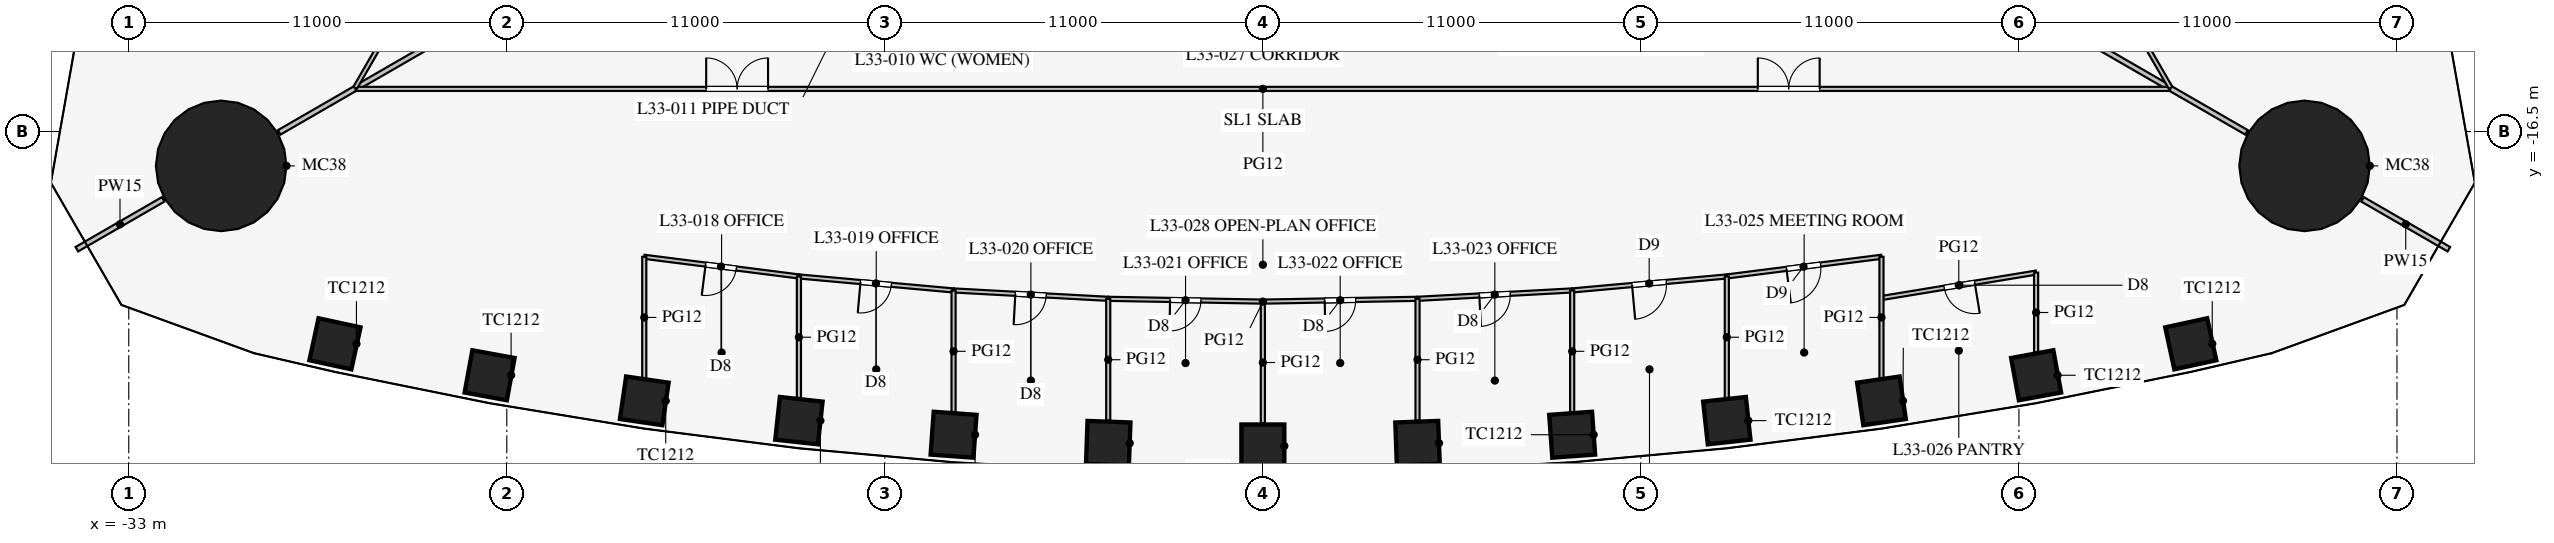
"""IFC4 building model, lengths in metres.
Left out: names, types, materials, properties, quantities, classifications, styles, units other than length and angle.
Written with IfcOpenShell. Run it as: python <this file> out.ifc"""

import sys

from ifc_helpers import new_model, si_unit, direction, frame, frame_2d, origin, origin_2d, place, context, subcontext, project, spatial, rectangle, circle, extrude, element, fill, save


model = new_model("IFC4")
c1 = context("Model", 3, precision=1e-05, world=origin(), true_north=direction((0.0, 1.0)))
c2 = subcontext(c1, "Body", "Model", "MODEL_VIEW")
j1 = project(units=[si_unit("LENGTHUNIT", "METRE"), si_unit("PLANEANGLEUNIT", "RADIAN")], contexts=[c1])
p1 = place(None, origin())
s1 = spatial("IfcSite", under=j1, at=p1, CompositionType="ELEMENT")
p2 = place(p1, origin())
s2 = spatial("IfcBuilding", under=s1, at=p2, CompositionType="ELEMENT")
p3 = place(p2, frame((0.0, 0.0, 145.1)))
s3 = spatial("IfcBuildingStorey", under=s2, at=p3, CompositionType="ELEMENT", Elevation=145.1)
for number, where, z_axis, x_axis in (
    (1, (-27.0, -22.677, 0.0), (0.0, 0.0, 1.0), (0.977, -0.212, 0.0)),
    (2, (-22.5, -23.593, 0.0), (0.0, 0.0, 1.0), (0.984, -0.18, 0.0)),
    (3, (-18.0, -24.337, 0.0), (0.0, 0.0, 1.0), (0.99, -0.144, 0.0)),
    (4, (-13.5, -24.913, 0.0), (0.0, 0.0, 1.0), (0.994, -0.108, 0.0)),
    (5, (-9.0, -25.323, 0.0), (0.0, 0.0, 1.0), (0.997, -0.072, 0.0)),
    (6, (-4.5, -25.568, 0.0), (0.0, 0.0, 1.0), (0.999, -0.036, 0.0)),
    (7, (0.0, -25.65, 0.0), (0.0, 0.0, 1.0), (1.0, 0.0, 0.0)),
    (8, (4.5, -25.568, 0.0), (0.0, 0.0, 1.0), (0.999, 0.036, 0.0)),
    (9, (9.0, -25.323, 0.0), (0.0, 0.0, 1.0), (0.997, 0.072, 0.0)),
    (10, (13.5, -24.913, 0.0), (0.0, 0.0, 1.0), (0.994, 0.108, 0.0)),
    (11, (18.0, -24.337, 0.0), (0.0, 0.0, 1.0), (0.99, 0.144, 0.0)),
    (12, (22.5, -23.593, 0.0), (0.0, 0.0, 1.0), (0.984, 0.18, 0.0)),
    (13, (27.0, -22.677, 0.0), (0.0, 0.0, 1.0), (0.977, 0.212, 0.0)),
):
    element("IfcColumn", number, at=place(p3, frame(where, z_axis=z_axis, x_axis=x_axis)), inside=s3, PredefinedType="COLUMN", context=c2, shape_type="SweptSolid", body=[
        extrude(rectangle(XDim=1.25, YDim=1.25, at=origin_2d()), origin(), (0.0, 0.0, 1.0), 4.2),
    ])
for number, where, z_axis, x_axis in (
    (14, (30.311, -17.5, 0.0), (0.0, 0.0, 1.0), (1.0, 0.0, 0.0)),
    (15, (-30.311, -17.5, 0.0), (0.0, 0.0, 1.0), (1.0, 0.0, 0.0)),
):
    element("IfcColumn", number, at=place(p3, frame(where, z_axis=z_axis, x_axis=x_axis)), inside=s3, PredefinedType="COLUMN", context=c2, shape_type="SweptSolid", body=[
        extrude(circle(Radius=1.9, at=origin_2d()), origin(), (0.0, 0.0, 1.0), 4.2),
    ])
p4 = place(p3, frame((14.203, -8.2, 0.0), z_axis=(0.0, 0.0, 1.0), x_axis=(0.866024668836, -0.500001272966, 0.0)))
e16 = element("IfcWall", 16, at=p4, inside=s3, PredefinedType="PARTITIONING", context=c2, shape_type="SweptSolid", body=[
    extrude(rectangle(XDim=16.65, YDim=0.15, at=frame_2d((8.325, 0.0))), origin(), (0.0, 0.0, 1.0), 2.3),
])
p5 = place(p3, frame((32.0, -18.475, 0.0), z_axis=(0.0, 0.0, 1.0), x_axis=(0.866042548026, -0.499970304126, 0.0)))
e17 = element("IfcWall", 17, at=p5, inside=s3, PredefinedType="PARTITIONING", context=c2, shape_type="SweptSolid", body=[
    extrude(rectangle(XDim=2.899, YDim=0.15, at=frame_2d((1.45, 0.0))), origin(), (0.0, 0.0, 1.0), 2.3),
])
p6 = place(p3, frame((-14.203, -8.2, 0.0), z_axis=(0.0, 0.0, 1.0), x_axis=(-0.866024668836, -0.500001272966, 0.0)))
e18 = element("IfcWall", 18, at=p6, inside=s3, PredefinedType="PARTITIONING", context=c2, shape_type="SweptSolid", body=[
    extrude(rectangle(XDim=16.65, YDim=0.15, at=frame_2d((8.325, 0.0))), origin(), (0.0, 0.0, 1.0), 2.3),
])
p7 = place(p3, frame((-32.0, -18.475, 0.0), z_axis=(0.0, 0.0, 1.0), x_axis=(-0.866042548026, -0.499970304126, 0.0)))
e19 = element("IfcWall", 19, at=p7, inside=s3, PredefinedType="PARTITIONING", context=c2, shape_type="SweptSolid", body=[
    extrude(rectangle(XDim=2.899, YDim=0.15, at=frame_2d((1.45, 0.0))), origin(), (0.0, 0.0, 1.0), 2.3),
])
p8 = place(p3, frame((-26.398, -15.26, 0.0), z_axis=(0.0, 0.0, 1.0), x_axis=(1.0, 0.0, 0.0)))
e20 = element("IfcWall", 20, at=p8, inside=s3, PredefinedType="PARTITIONING", context=c2, shape_type="SweptSolid", body=[
    extrude(rectangle(XDim=52.796, YDim=0.12, at=frame_2d((26.398, 0.0))), origin(), (0.0, 0.0, 1.0), 2.9),
])
p9 = place(p8, frame((10.2, 0.0, 0.15)))
e21 = element("IfcOpeningElement", 21, at=p9, cuts=e20, PredefinedType="OPENING", context=c2, shape_type="SweptSolid", body=[
    extrude(rectangle(XDim=1.8, YDim=2.1, at=frame_2d((0.9, 1.05))), frame((0.0, 0.07, 0.0), z_axis=(0.0, -1.0, 0.0), x_axis=(1.0, 0.0, 0.0)), (0.0, 0.0, 1.0), 0.14),
])
p10 = place(p8, frame((40.8, 0.0, 0.15)))
e22 = element("IfcOpeningElement", 22, at=p10, cuts=e20, PredefinedType="OPENING", context=c2, shape_type="SweptSolid", body=[
    extrude(rectangle(XDim=1.8, YDim=2.1, at=frame_2d((0.9, 1.05))), frame((0.0, 0.07, 0.0), z_axis=(0.0, -1.0, 0.0), x_axis=(1.0, 0.0, 0.0)), (0.0, 0.0, 1.0), 0.14),
])
p11 = place(p3, frame((0.0, -21.45, 0.0), z_axis=(0.0, 0.0, 1.0), x_axis=(0.999837820638, 0.018009231578, 0.0)))
e23 = element("IfcWall", 23, at=p11, inside=s3, PredefinedType="PARTITIONING", context=c2, shape_type="SweptSolid", body=[
    extrude(rectangle(XDim=4.501, YDim=0.12, at=frame_2d((2.25, 0.0))), origin(), (0.0, 0.0, 1.0), 2.9),
])
p12 = place(p11, frame((1.8, 0.0, 0.15)))
e24 = element("IfcOpeningElement", 24, at=p12, cuts=e23, PredefinedType="OPENING", context=c2, shape_type="SweptSolid", body=[
    extrude(rectangle(XDim=0.9, YDim=2.1, at=frame_2d((0.45, 1.05))), frame((0.0, 0.07, 0.0), z_axis=(0.0, -1.0, 0.0), x_axis=(1.0, 0.0, 0.0)), (0.0, 0.0, 1.0), 0.14),
])
p13 = place(p3, frame((13.5, -20.718, 0.0), z_axis=(0.0, 0.0, 1.0), x_axis=(0.992010652594, 0.12615413247, 0.0)))
e25 = element("IfcWall", 25, at=p13, inside=s3, PredefinedType="PARTITIONING", context=c2, shape_type="SweptSolid", body=[
    extrude(rectangle(XDim=4.536, YDim=0.12, at=frame_2d((2.268, 0.0))), origin(), (0.0, 0.0, 1.0), 2.9),
])
p14 = place(p13, frame((1.75, 0.0, 0.15)))
e26 = element("IfcOpeningElement", 26, at=p14, cuts=e25, PredefinedType="OPENING", context=c2, shape_type="SweptSolid", body=[
    extrude(rectangle(XDim=1.0, YDim=2.1, at=frame_2d((0.5, 1.05))), frame((0.0, 0.07, 0.0), z_axis=(0.0, -1.0, 0.0), x_axis=(1.0, 0.0, 0.0)), (0.0, 0.0, 1.0), 0.14),
])
p15 = place(p3, frame((18.0, -21.345, 0.0), z_axis=(0.0, 0.0, 1.0), x_axis=(0.986764681833, 0.162158757664, 0.0)))
e27 = element("IfcWall", 27, at=p15, inside=s3, PredefinedType="PARTITIONING", context=c2, shape_type="SweptSolid", body=[
    extrude(rectangle(XDim=4.56, YDim=0.12, at=frame_2d((2.28, 0.0))), origin(), (0.0, 0.0, 1.0), 2.9),
])
p16 = place(p15, frame((1.85, 0.0, 0.15)))
e28 = element("IfcOpeningElement", 28, at=p16, cuts=e27, PredefinedType="OPENING", context=c2, shape_type="SweptSolid", body=[
    extrude(rectangle(XDim=0.9, YDim=2.1, at=frame_2d((0.45, 1.05))), frame((0.0, 0.07, 0.0), z_axis=(0.0, -1.0, 0.0), x_axis=(1.0, 0.0, 0.0)), (0.0, 0.0, 1.0), 0.14),
])
p17 = place(p3, frame((4.5, -21.369, 0.0), z_axis=(0.0, 0.0, 1.0), x_axis=(0.998537376538, 0.054065771581, 0.0)))
e29 = element("IfcWall", 29, at=p17, inside=s3, PredefinedType="PARTITIONING", context=c2, shape_type="SweptSolid", body=[
    extrude(rectangle(XDim=4.507, YDim=0.12, at=frame_2d((2.253, 0.0))), origin(), (0.0, 0.0, 1.0), 2.9),
])
p18 = place(p17, frame((1.8, 0.0, 0.15)))
e30 = element("IfcOpeningElement", 30, at=p18, cuts=e29, PredefinedType="OPENING", context=c2, shape_type="SweptSolid", body=[
    extrude(rectangle(XDim=0.9, YDim=2.1, at=frame_2d((0.45, 1.05))), frame((0.0, 0.07, 0.0), z_axis=(0.0, -1.0, 0.0), x_axis=(1.0, 0.0, 0.0)), (0.0, 0.0, 1.0), 0.14),
])
p19 = place(p3, frame((9.0, -21.125, 0.0), z_axis=(0.0, 0.0, 1.0), x_axis=(0.995930325215, 0.090126507295, 0.0)))
e31 = element("IfcWall", 31, at=p19, inside=s3, PredefinedType="PARTITIONING", context=c2, shape_type="SweptSolid", body=[
    extrude(rectangle(XDim=4.518, YDim=0.12, at=frame_2d((2.259, 0.0))), origin(), (0.0, 0.0, 1.0), 2.9),
])
p20 = place(p19, frame((1.75, 0.0, 0.15)))
e32 = element("IfcOpeningElement", 32, at=p20, cuts=e31, PredefinedType="OPENING", context=c2, shape_type="SweptSolid", body=[
    extrude(rectangle(XDim=1.0, YDim=2.1, at=frame_2d((0.5, 1.05))), frame((0.0, 0.07, 0.0), z_axis=(0.0, -1.0, 0.0), x_axis=(1.0, 0.0, 0.0)), (0.0, 0.0, 1.0), 0.14),
])
p21 = place(p3, frame((-13.5, -20.718, 0.0), z_axis=(0.0, 0.0, 1.0), x_axis=(0.995930325215, -0.090126507295, 0.0)))
e33 = element("IfcWall", 33, at=p21, inside=s3, PredefinedType="PARTITIONING", context=c2, shape_type="SweptSolid", body=[
    extrude(rectangle(XDim=4.518, YDim=0.12, at=frame_2d((2.259, 0.0))), origin(), (0.0, 0.0, 1.0), 2.9),
])
p22 = place(p21, frame((1.8, 0.0, 0.15)))
e34 = element("IfcOpeningElement", 34, at=p22, cuts=e33, PredefinedType="OPENING", context=c2, shape_type="SweptSolid", body=[
    extrude(rectangle(XDim=0.9, YDim=2.1, at=frame_2d((0.45, 1.05))), frame((0.0, 0.07, 0.0), z_axis=(0.0, -1.0, 0.0), x_axis=(1.0, 0.0, 0.0)), (0.0, 0.0, 1.0), 0.14),
])
p23 = place(p3, frame((-18.0, -20.146, 0.0), z_axis=(0.0, 0.0, 1.0), x_axis=(0.992010652594, -0.12615413247, 0.0)))
e35 = element("IfcWall", 35, at=p23, inside=s3, PredefinedType="PARTITIONING", context=c2, shape_type="SweptSolid", body=[
    extrude(rectangle(XDim=4.536, YDim=0.12, at=frame_2d((2.268, 0.0))), origin(), (0.0, 0.0, 1.0), 2.9),
])
p24 = place(p23, frame((1.8, 0.0, 0.15)))
e36 = element("IfcOpeningElement", 36, at=p24, cuts=e35, PredefinedType="OPENING", context=c2, shape_type="SweptSolid", body=[
    extrude(rectangle(XDim=0.9, YDim=2.1, at=frame_2d((0.45, 1.05))), frame((0.0, 0.07, 0.0), z_axis=(0.0, -1.0, 0.0), x_axis=(1.0, 0.0, 0.0)), (0.0, 0.0, 1.0), 0.14),
])
p25 = place(p3, frame((-4.5, -21.369, 0.0), z_axis=(0.0, 0.0, 1.0), x_axis=(0.999837820638, -0.018009231578, 0.0)))
e37 = element("IfcWall", 37, at=p25, inside=s3, PredefinedType="PARTITIONING", context=c2, shape_type="SweptSolid", body=[
    extrude(rectangle(XDim=4.501, YDim=0.12, at=frame_2d((2.25, 0.0))), origin(), (0.0, 0.0, 1.0), 2.9),
])
p26 = place(p25, frame((1.8, 0.0, 0.15)))
e38 = element("IfcOpeningElement", 38, at=p26, cuts=e37, PredefinedType="OPENING", context=c2, shape_type="SweptSolid", body=[
    extrude(rectangle(XDim=0.9, YDim=2.1, at=frame_2d((0.45, 1.05))), frame((0.0, 0.07, 0.0), z_axis=(0.0, -1.0, 0.0), x_axis=(1.0, 0.0, 0.0)), (0.0, 0.0, 1.0), 0.14),
])
p27 = place(p3, frame((-9.0, -21.125, 0.0), z_axis=(0.0, 0.0, 1.0), x_axis=(0.998537376538, -0.054065771581, 0.0)))
e39 = element("IfcWall", 39, at=p27, inside=s3, PredefinedType="PARTITIONING", context=c2, shape_type="SweptSolid", body=[
    extrude(rectangle(XDim=4.507, YDim=0.12, at=frame_2d((2.253, 0.0))), origin(), (0.0, 0.0, 1.0), 2.9),
])
p28 = place(p27, frame((1.8, 0.0, 0.15)))
e40 = element("IfcOpeningElement", 40, at=p28, cuts=e39, PredefinedType="OPENING", context=c2, shape_type="SweptSolid", body=[
    extrude(rectangle(XDim=0.9, YDim=2.1, at=frame_2d((0.45, 1.05))), frame((0.0, 0.07, 0.0), z_axis=(0.0, -1.0, 0.0), x_axis=(1.0, 0.0, 0.0)), (0.0, 0.0, 1.0), 0.14),
])
p29 = place(p3, frame((0.0, -21.45, 0.0), z_axis=(0.0, 0.0, 1.0), x_axis=(0.0, -1.0, 0.0)))
e41 = element("IfcWall", 41, at=p29, inside=s3, PredefinedType="PARTITIONING", context=c2, shape_type="SweptSolid", body=[
    extrude(rectangle(XDim=3.545, YDim=0.12, at=frame_2d((1.772, 0.0))), origin(), (0.0, 0.0, 1.0), 2.9),
])
p30 = place(p3, frame((13.5, -20.718, 0.0), z_axis=(0.0, 0.0, 1.0), x_axis=(0.0, -1.0, 0.0)))
e42 = element("IfcWall", 42, at=p30, inside=s3, PredefinedType="PARTITIONING", context=c2, shape_type="SweptSolid", body=[
    extrude(rectangle(XDim=3.537, YDim=0.12, at=frame_2d((1.768, 0.0))), origin(), (0.0, 0.0, 1.0), 2.9),
])
p31 = place(p3, frame((18.0, -20.146, 0.0), z_axis=(0.0, 0.0, 1.0), x_axis=(0.0, -1.0, 0.0)))
e43 = element("IfcWall", 43, at=p31, inside=s3, PredefinedType="PARTITIONING", context=c2, shape_type="SweptSolid", body=[
    extrude(rectangle(XDim=3.53, YDim=0.12, at=frame_2d((1.765, 0.0))), origin(), (0.0, 0.0, 1.0), 2.9),
])
p32 = place(p3, frame((22.5, -20.606, 0.0), z_axis=(0.0, 0.0, 1.0), x_axis=(0.0, -1.0, 0.0)))
e44 = element("IfcWall", 44, at=p32, inside=s3, PredefinedType="PARTITIONING", context=c2, shape_type="SweptSolid", body=[
    extrude(rectangle(XDim=2.321, YDim=0.12, at=frame_2d((1.16, 0.0))), origin(), (0.0, 0.0, 1.0), 2.9),
])
p33 = place(p3, frame((4.5, -21.369, 0.0), z_axis=(0.0, 0.0, 1.0), x_axis=(0.0, -1.0, 0.0)))
e45 = element("IfcWall", 45, at=p33, inside=s3, PredefinedType="PARTITIONING", context=c2, shape_type="SweptSolid", body=[
    extrude(rectangle(XDim=3.544, YDim=0.12, at=frame_2d((1.772, 0.0))), origin(), (0.0, 0.0, 1.0), 2.9),
])
p34 = place(p3, frame((9.0, -21.125, 0.0), z_axis=(0.0, 0.0, 1.0), x_axis=(0.0, -1.0, 0.0)))
e46 = element("IfcWall", 46, at=p34, inside=s3, PredefinedType="PARTITIONING", context=c2, shape_type="SweptSolid", body=[
    extrude(rectangle(XDim=3.541, YDim=0.12, at=frame_2d((1.771, 0.0))), origin(), (0.0, 0.0, 1.0), 2.9),
])
p35 = place(p3, frame((-13.5, -20.718, 0.0), z_axis=(0.0, 0.0, 1.0), x_axis=(0.0, -1.0, 0.0)))
e47 = element("IfcWall", 47, at=p35, inside=s3, PredefinedType="PARTITIONING", context=c2, shape_type="SweptSolid", body=[
    extrude(rectangle(XDim=3.537, YDim=0.12, at=frame_2d((1.768, 0.0))), origin(), (0.0, 0.0, 1.0), 2.9),
])
p36 = place(p3, frame((-18.0, -20.146, 0.0), z_axis=(0.0, 0.0, 1.0), x_axis=(0.0, -1.0, 0.0)))
e48 = element("IfcWall", 48, at=p36, inside=s3, PredefinedType="PARTITIONING", context=c2, shape_type="SweptSolid", body=[
    extrude(rectangle(XDim=3.53, YDim=0.12, at=frame_2d((1.765, 0.0))), origin(), (0.0, 0.0, 1.0), 2.9),
])
p37 = place(p3, frame((-4.5, -21.369, 0.0), z_axis=(0.0, 0.0, 1.0), x_axis=(0.0, -1.0, 0.0)))
e49 = element("IfcWall", 49, at=p37, inside=s3, PredefinedType="PARTITIONING", context=c2, shape_type="SweptSolid", body=[
    extrude(rectangle(XDim=3.544, YDim=0.12, at=frame_2d((1.772, 0.0))), origin(), (0.0, 0.0, 1.0), 2.9),
])
p38 = place(p3, frame((-9.0, -21.125, 0.0), z_axis=(0.0, 0.0, 1.0), x_axis=(0.0, -1.0, 0.0)))
e50 = element("IfcWall", 50, at=p38, inside=s3, PredefinedType="PARTITIONING", context=c2, shape_type="SweptSolid", body=[
    extrude(rectangle(XDim=3.541, YDim=0.12, at=frame_2d((1.771, 0.0))), origin(), (0.0, 0.0, 1.0), 2.9),
])
p39 = place(p3, frame((26.415, -15.231, 0.0), z_axis=(0.0, 0.0, 1.0), x_axis=(-0.50000091641, 0.866024874695, 0.0)))
e51 = element("IfcWall", 51, at=p39, inside=s3, PredefinedType="PARTITIONING", context=c2, shape_type="SweptSolid", body=[
    extrude(rectangle(XDim=52.796, YDim=0.12, at=frame_2d((26.398, 0.0))), origin(), (0.0, 0.0, 1.0), 2.9),
])
p40 = place(p39, frame((10.2, 0.0, 0.15)))
e52 = element("IfcOpeningElement", 52, at=p40, cuts=e51, PredefinedType="OPENING", context=c2, shape_type="SweptSolid", body=[
    extrude(rectangle(XDim=1.8, YDim=2.1, at=frame_2d((0.9, 1.05))), frame((0.0, 0.07, 0.0), z_axis=(0.0, -1.0, 0.0), x_axis=(1.0, 0.0, 0.0)), (0.0, 0.0, 1.0), 0.14),
])
p41 = place(p39, frame((40.8, 0.0, 0.15)))
e53 = element("IfcOpeningElement", 53, at=p41, cuts=e51, PredefinedType="OPENING", context=c2, shape_type="SweptSolid", body=[
    extrude(rectangle(XDim=1.8, YDim=2.1, at=frame_2d((0.9, 1.05))), frame((0.0, 0.07, 0.0), z_axis=(0.0, -1.0, 0.0), x_axis=(1.0, 0.0, 0.0)), (0.0, 0.0, 1.0), 0.14),
])
p42 = place(p3, frame((-0.016, 30.491, 0.0), z_axis=(0.0, 0.0, 1.0), x_axis=(-0.50000091641, -0.866024874695, 0.0)))
e54 = element("IfcWall", 54, at=p42, inside=s3, PredefinedType="PARTITIONING", context=c2, shape_type="SweptSolid", body=[
    extrude(rectangle(XDim=52.796, YDim=0.12, at=frame_2d((26.398, 0.0))), origin(), (0.0, 0.0, 1.0), 2.9),
])
p43 = place(p42, frame((10.2, 0.0, 0.15)))
e55 = element("IfcOpeningElement", 55, at=p43, cuts=e54, PredefinedType="OPENING", context=c2, shape_type="SweptSolid", body=[
    extrude(rectangle(XDim=1.8, YDim=2.1, at=frame_2d((0.9, 1.05))), frame((0.0, 0.07, 0.0), z_axis=(0.0, -1.0, 0.0), x_axis=(1.0, 0.0, 0.0)), (0.0, 0.0, 1.0), 0.14),
])
p44 = place(p42, frame((40.8, 0.0, 0.15)))
e56 = element("IfcOpeningElement", 56, at=p44, cuts=e54, PredefinedType="OPENING", context=c2, shape_type="SweptSolid", body=[
    extrude(rectangle(XDim=1.8, YDim=2.1, at=frame_2d((0.9, 1.05))), frame((0.0, 0.07, 0.0), z_axis=(0.0, -1.0, 0.0), x_axis=(1.0, 0.0, 0.0)), (0.0, 0.0, 1.0), 0.14),
])
p45 = place(p24, frame((0.9, 0.0, 0.0), z_axis=(0.0, 0.0, 1.0), x_axis=(-1.0, 0.0, 0.0)))
e57 = element("IfcDoor", 57, at=p45, inside=s3, OperationType="SINGLE_SWING_RIGHT", PredefinedType="DOOR", context=c2, shape_type="SweptSolid", body=[
    extrude(rectangle(XDim=0.9, YDim=2.1, at=frame_2d((0.45, 1.05))), frame((0.0, 0.025, 0.0), z_axis=(0.0, -1.0, 0.0), x_axis=(1.0, 0.0, 0.0)), (0.0, 0.0, 1.0), 0.05),
])
fill(e36, e57)
p46 = place(p22, frame((0.9, 0.0, 0.0), z_axis=(0.0, 0.0, 1.0), x_axis=(-1.0, 0.0, 0.0)))
e58 = element("IfcDoor", 58, at=p46, inside=s3, OperationType="SINGLE_SWING_RIGHT", PredefinedType="DOOR", context=c2, shape_type="SweptSolid", body=[
    extrude(rectangle(XDim=0.9, YDim=2.1, at=frame_2d((0.45, 1.05))), frame((0.0, 0.025, 0.0), z_axis=(0.0, -1.0, 0.0), x_axis=(1.0, 0.0, 0.0)), (0.0, 0.0, 1.0), 0.05),
])
fill(e34, e58)
p47 = place(p28, frame((0.9, 0.0, 0.0), z_axis=(0.0, 0.0, 1.0), x_axis=(-1.0, 0.0, 0.0)))
e59 = element("IfcDoor", 59, at=p47, inside=s3, OperationType="SINGLE_SWING_RIGHT", PredefinedType="DOOR", context=c2, shape_type="SweptSolid", body=[
    extrude(rectangle(XDim=0.9, YDim=2.1, at=frame_2d((0.45, 1.05))), frame((0.0, 0.025, 0.0), z_axis=(0.0, -1.0, 0.0), x_axis=(1.0, 0.0, 0.0)), (0.0, 0.0, 1.0), 0.05),
])
fill(e40, e59)
p48 = place(p26, frame((0.9, 0.0, 0.0), z_axis=(0.0, 0.0, 1.0), x_axis=(-1.0, 0.0, 0.0)))
e60 = element("IfcDoor", 60, at=p48, inside=s3, OperationType="SINGLE_SWING_RIGHT", PredefinedType="DOOR", context=c2, shape_type="SweptSolid", body=[
    extrude(rectangle(XDim=0.9, YDim=2.1, at=frame_2d((0.45, 1.05))), frame((0.0, 0.025, 0.0), z_axis=(0.0, -1.0, 0.0), x_axis=(1.0, 0.0, 0.0)), (0.0, 0.0, 1.0), 0.05),
])
fill(e38, e60)
p49 = place(p12, frame((0.9, 0.0, 0.0), z_axis=(0.0, 0.0, 1.0), x_axis=(-1.0, 0.0, 0.0)))
e61 = element("IfcDoor", 61, at=p49, inside=s3, OperationType="SINGLE_SWING_RIGHT", PredefinedType="DOOR", context=c2, shape_type="SweptSolid", body=[
    extrude(rectangle(XDim=0.9, YDim=2.1, at=frame_2d((0.45, 1.05))), frame((0.0, 0.025, 0.0), z_axis=(0.0, -1.0, 0.0), x_axis=(1.0, 0.0, 0.0)), (0.0, 0.0, 1.0), 0.05),
])
fill(e24, e61)
p50 = place(p18, frame((0.9, 0.0, 0.0), z_axis=(0.0, 0.0, 1.0), x_axis=(-1.0, 0.0, 0.0)))
e62 = element("IfcDoor", 62, at=p50, inside=s3, OperationType="SINGLE_SWING_RIGHT", PredefinedType="DOOR", context=c2, shape_type="SweptSolid", body=[
    extrude(rectangle(XDim=0.9, YDim=2.1, at=frame_2d((0.45, 1.05))), frame((0.0, 0.025, 0.0), z_axis=(0.0, -1.0, 0.0), x_axis=(1.0, 0.0, 0.0)), (0.0, 0.0, 1.0), 0.05),
])
fill(e30, e62)
p51 = place(p20, frame((1.0, 0.0, 0.0), z_axis=(0.0, 0.0, 1.0), x_axis=(-1.0, 0.0, 0.0)))
e63 = element("IfcDoor", 63, at=p51, inside=s3, OperationType="SINGLE_SWING_RIGHT", PredefinedType="DOOR", context=c2, shape_type="SweptSolid", body=[
    extrude(rectangle(XDim=1.0, YDim=2.1, at=frame_2d((0.5, 1.05))), frame((0.0, 0.025, 0.0), z_axis=(0.0, -1.0, 0.0), x_axis=(1.0, 0.0, 0.0)), (0.0, 0.0, 1.0), 0.05),
])
fill(e32, e63)
p52 = place(p14, frame((1.0, 0.0, 0.0), z_axis=(0.0, 0.0, 1.0), x_axis=(-1.0, 0.0, 0.0)))
e64 = element("IfcDoor", 64, at=p52, inside=s3, OperationType="SINGLE_SWING_RIGHT", PredefinedType="DOOR", context=c2, shape_type="SweptSolid", body=[
    extrude(rectangle(XDim=1.0, YDim=2.1, at=frame_2d((0.5, 1.05))), frame((0.0, 0.025, 0.0), z_axis=(0.0, -1.0, 0.0), x_axis=(1.0, 0.0, 0.0)), (0.0, 0.0, 1.0), 0.05),
])
fill(e26, e64)
p53 = place(p16, frame((0.9, 0.0, 0.0), z_axis=(0.0, 0.0, 1.0), x_axis=(-1.0, 0.0, 0.0)))
e65 = element("IfcDoor", 65, at=p53, inside=s3, OperationType="SINGLE_SWING_LEFT", PredefinedType="DOOR", context=c2, shape_type="SweptSolid", body=[
    extrude(rectangle(XDim=0.9, YDim=2.1, at=frame_2d((0.45, 1.05))), frame((0.0, 0.025, 0.0), z_axis=(0.0, -1.0, 0.0), x_axis=(1.0, 0.0, 0.0)), (0.0, 0.0, 1.0), 0.05),
])
fill(e28, e65)
p54 = place(p9, origin())
e66 = element("IfcDoor", 66, at=p54, inside=s3, OperationType="DOUBLE_DOOR_SINGLE_SWING", PredefinedType="DOOR", context=c2, shape_type="SweptSolid", body=[
    extrude(rectangle(XDim=1.8, YDim=2.1, at=frame_2d((0.9, 1.05))), frame((0.0, 0.025, 0.0), z_axis=(0.0, -1.0, 0.0), x_axis=(1.0, 0.0, 0.0)), (0.0, 0.0, 1.0), 0.05),
])
fill(e21, e66)
p55 = place(p10, origin())
e67 = element("IfcDoor", 67, at=p55, inside=s3, OperationType="DOUBLE_DOOR_SINGLE_SWING", PredefinedType="DOOR", context=c2, shape_type="SweptSolid", body=[
    extrude(rectangle(XDim=1.8, YDim=2.1, at=frame_2d((0.9, 1.05))), frame((0.0, 0.025, 0.0), z_axis=(0.0, -1.0, 0.0), x_axis=(1.0, 0.0, 0.0)), (0.0, 0.0, 1.0), 0.05),
])
fill(e22, e67)
save(model, sys.argv[1])
